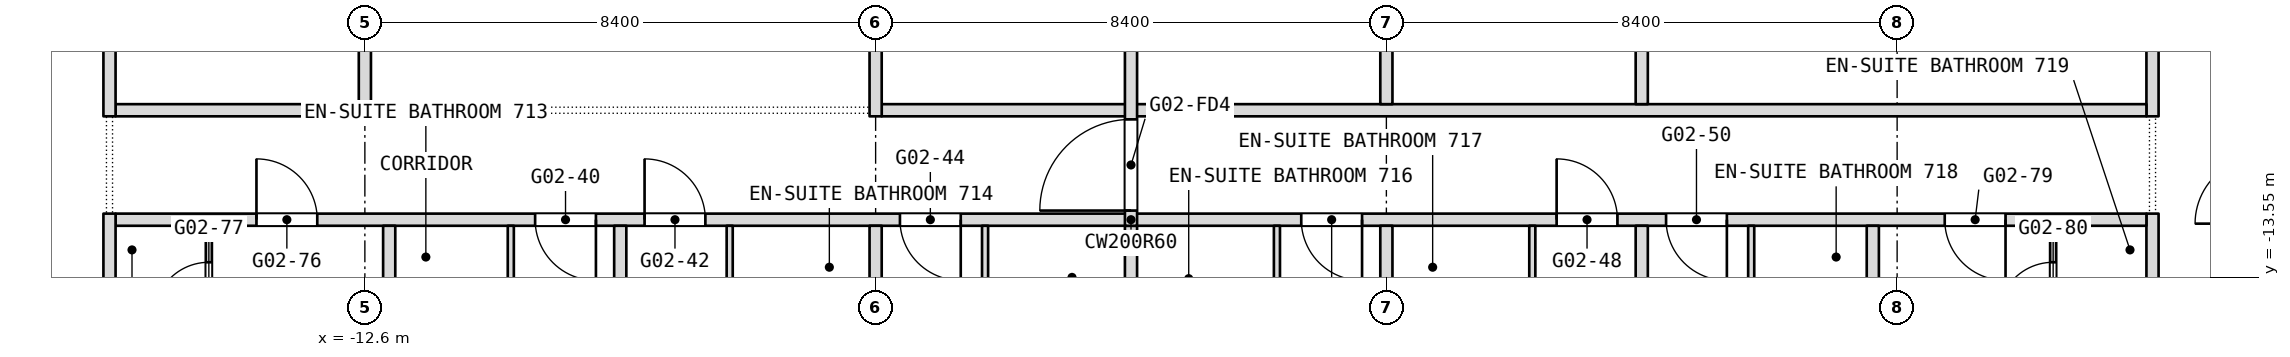
"""IFC4 building model, lengths in metres.
Left out: names, types, materials, properties, quantities, classifications, styles, units other than length and angle.
Written with IfcOpenShell. Run it as: python <this file> out.ifc"""

import sys

from ifc_helpers import new_model, si_unit, direction, frame, frame_2d, origin, place, context, subcontext, project, spatial, rectangle, extrude, element, fill, save


model = new_model("IFC4")
c1 = context("Model", 3, precision=1e-05, world=origin(), true_north=direction((0.0, 1.0)))
c2 = subcontext(c1, "Body", "Model", "MODEL_VIEW")
j1 = project(units=[si_unit("LENGTHUNIT", "METRE"), si_unit("PLANEANGLEUNIT", "RADIAN")], contexts=[c1])
p1 = place(None, origin())
s1 = spatial("IfcSite", under=j1, at=p1, CompositionType="ELEMENT")
p2 = place(p1, origin())
s2 = spatial("IfcBuilding", under=s1, at=p2, CompositionType="ELEMENT")
p3 = place(p2, frame((0.0, 0.0, 40.1)))
s3 = spatial("IfcBuildingStorey", under=s2, at=p3, CompositionType="ELEMENT", Elevation=40.1)
p4 = place(p3, frame((16.8, -17.143, 0.0), z_axis=(0.0, 0.0, 1.0), x_axis=(0.0, 1.0, 0.0)))
e1 = element("IfcWall", 1, at=p4, inside=s3, PredefinedType="PARTITIONING", context=c2, shape_type="SweptSolid", body=[
    extrude(rectangle(XDim=4.643, YDim=0.2, at=frame_2d((2.322, 0.0))), origin(), (0.0, 0.0, 1.0), 3.34),
])
p5 = place(p4, frame((0.772, 0.0, 0.0)))
e2 = element("IfcOpeningElement", 2, at=p5, cuts=e1, PredefinedType="OPENING", context=c2, shape_type="SweptSolid", body=[
    extrude(rectangle(XDim=0.9, YDim=2.1, at=frame_2d((0.45, 1.05))), frame((0.0, 0.1, 0.0), z_axis=(0.0, -1.0, 0.0), x_axis=(1.0, 0.0, 0.0)), (0.0, 0.0, 1.0), 0.2),
])
p6 = place(p3, frame((16.8, -10.9, 0.0), z_axis=(0.0, 0.0, 1.0), x_axis=(0.0, 1.0, 0.0)))
e3 = element("IfcWall", 3, at=p6, inside=s3, PredefinedType="PARTITIONING", context=c2, shape_type="SweptSolid", body=[
    extrude(rectangle(XDim=7.3, YDim=0.2, at=frame_2d((3.65, 0.0))), origin(), (0.0, 0.0, 1.0), 3.34),
])
p7 = place(p6, frame((3.15, 0.0, 0.0)))
e4 = element("IfcOpeningElement", 4, at=p7, cuts=e3, PredefinedType="OPENING", context=c2, shape_type="SweptSolid", body=[
    extrude(rectangle(XDim=1.0, YDim=2.1, at=frame_2d((0.5, 1.05))), frame((0.0, 0.1, 0.0), z_axis=(0.0, -1.0, 0.0), x_axis=(1.0, 0.0, 0.0)), (0.0, 0.0, 1.0), 0.2),
])
p8 = place(p3, frame((15.166, -15.0, 0.0), z_axis=(0.0, 0.0, 1.0), x_axis=(0.0, 1.0, 0.0)))
e5 = element("IfcWall", 5, at=p8, inside=s3, PredefinedType="PARTITIONING", context=c2, shape_type="SweptSolid", body=[
    extrude(rectangle(XDim=2.3, YDim=0.1, at=frame_2d((1.15, 0.0))), origin(), (0.0, 0.0, 1.0), 3.34),
])
p9 = place(p8, frame((0.8, 0.0, 0.0)))
e6 = element("IfcOpeningElement", 6, at=p9, cuts=e5, PredefinedType="OPENING", context=c2, shape_type="SweptSolid", body=[
    extrude(rectangle(XDim=0.9, YDim=2.1, at=frame_2d((0.45, 1.05))), frame((0.0, 0.05, 0.0), z_axis=(0.0, -1.0, 0.0), x_axis=(1.0, 0.0, 0.0)), (0.0, 0.0, 1.0), 0.1),
])
p10 = place(p3, frame((-16.7, -12.6, 0.0), z_axis=(0.0, 0.0, 1.0), x_axis=(1.0, 0.0, 0.0)))
e7 = element("IfcWall", 7, at=p10, inside=s3, PredefinedType="PARTITIONING", context=c2, shape_type="SweptSolid", body=[
    extrude(rectangle(XDim=33.4, YDim=0.2, at=frame_2d((16.7, 0.0))), origin(), (0.0, 0.0, 1.0), 3.34),
])
p11 = place(p10, frame((6.9, 0.0, 0.0)))
e8 = element("IfcOpeningElement", 8, at=p11, cuts=e7, PredefinedType="OPENING", context=c2, shape_type="SweptSolid", body=[
    extrude(rectangle(XDim=1.0, YDim=2.1, at=frame_2d((0.5, 1.05))), frame((0.0, 0.1, 0.0), z_axis=(0.0, -1.0, 0.0), x_axis=(1.0, 0.0, 0.0)), (0.0, 0.0, 1.0), 0.2),
])
p12 = place(p10, frame((8.7, 0.0, 0.0)))
e9 = element("IfcOpeningElement", 9, at=p12, cuts=e7, PredefinedType="OPENING", context=c2, shape_type="SweptSolid", body=[
    extrude(rectangle(XDim=1.0, YDim=2.1, at=frame_2d((0.5, 1.05))), frame((0.0, 0.1, 0.0), z_axis=(0.0, -1.0, 0.0), x_axis=(1.0, 0.0, 0.0)), (0.0, 0.0, 1.0), 0.2),
])
p13 = place(p10, frame((12.9, 0.0, 0.0)))
e10 = element("IfcOpeningElement", 10, at=p13, cuts=e7, PredefinedType="OPENING", context=c2, shape_type="SweptSolid", body=[
    extrude(rectangle(XDim=1.0, YDim=2.1, at=frame_2d((0.5, 1.05))), frame((0.0, 0.1, 0.0), z_axis=(0.0, -1.0, 0.0), x_axis=(1.0, 0.0, 0.0)), (0.0, 0.0, 1.0), 0.2),
])
p14 = place(p10, frame((19.5, 0.0, 0.0)))
e11 = element("IfcOpeningElement", 11, at=p14, cuts=e7, PredefinedType="OPENING", context=c2, shape_type="SweptSolid", body=[
    extrude(rectangle(XDim=1.0, YDim=2.1, at=frame_2d((0.5, 1.05))), frame((0.0, 0.1, 0.0), z_axis=(0.0, -1.0, 0.0), x_axis=(1.0, 0.0, 0.0)), (0.0, 0.0, 1.0), 0.2),
])
p15 = place(p10, frame((23.7, 0.0, 0.0)))
e12 = element("IfcOpeningElement", 12, at=p15, cuts=e7, PredefinedType="OPENING", context=c2, shape_type="SweptSolid", body=[
    extrude(rectangle(XDim=1.0, YDim=2.1, at=frame_2d((0.5, 1.05))), frame((0.0, 0.1, 0.0), z_axis=(0.0, -1.0, 0.0), x_axis=(1.0, 0.0, 0.0)), (0.0, 0.0, 1.0), 0.2),
])
p16 = place(p10, frame((25.5, 0.0, 0.0)))
e13 = element("IfcOpeningElement", 13, at=p16, cuts=e7, PredefinedType="OPENING", context=c2, shape_type="SweptSolid", body=[
    extrude(rectangle(XDim=1.0, YDim=2.1, at=frame_2d((0.5, 1.05))), frame((0.0, 0.1, 0.0), z_axis=(0.0, -1.0, 0.0), x_axis=(1.0, 0.0, 0.0)), (0.0, 0.0, 1.0), 0.2),
])
p17 = place(p10, frame((2.317, 0.0, 0.0)))
e14 = element("IfcOpeningElement", 14, at=p17, cuts=e7, PredefinedType="OPENING", context=c2, shape_type="SweptSolid", body=[
    extrude(rectangle(XDim=1.0, YDim=2.1, at=frame_2d((0.5, 1.05))), frame((0.0, 0.1, 0.0), z_axis=(0.0, -1.0, 0.0), x_axis=(1.0, 0.0, 0.0)), (0.0, 0.0, 1.0), 0.2),
])
p18 = place(p10, frame((30.083, 0.0, 0.0)))
e15 = element("IfcOpeningElement", 15, at=p18, cuts=e7, PredefinedType="OPENING", context=c2, shape_type="SweptSolid", body=[
    extrude(rectangle(XDim=1.0, YDim=2.1, at=frame_2d((0.5, 1.05))), frame((0.0, 0.1, 0.0), z_axis=(0.0, -1.0, 0.0), x_axis=(1.0, 0.0, 0.0)), (0.0, 0.0, 1.0), 0.2),
])
p19 = place(p3, frame((12.2, -15.325, 0.0), z_axis=(0.0, 0.0, 1.0), x_axis=(0.0, 1.0, 0.0)))
e16 = element("IfcWall", 16, at=p19, inside=s3, PredefinedType="PARTITIONING", context=c2, shape_type="SweptSolid", body=[
    extrude(rectangle(XDim=2.625, YDim=0.2, at=frame_2d((1.312, 0.0))), origin(), (0.0, 0.0, 1.0), 3.34),
])
p20 = place(p3, frame((-16.7, -10.8, 0.0), z_axis=(0.0, 0.0, 1.0), x_axis=(1.0, 0.0, 0.0)))
e17 = element("IfcWall", 17, at=p20, inside=s3, PredefinedType="PARTITIONING", context=c2, shape_type="SweptSolid", body=[
    extrude(rectangle(XDim=4.0, YDim=0.2, at=frame_2d((2.0, 0.0))), origin(), (0.0, 0.0, 1.0), 3.34),
])
p21 = place(p3, frame((-4.1, -10.8, 0.0), z_axis=(0.0, 0.0, 1.0), x_axis=(1.0, 0.0, 0.0)))
e18 = element("IfcWall", 18, at=p21, inside=s3, PredefinedType="PARTITIONING", context=c2, shape_type="SweptSolid", body=[
    extrude(rectangle(XDim=20.8, YDim=0.2, at=frame_2d((10.4, 0.0))), origin(), (0.0, 0.0, 1.0), 3.34),
])
p22 = place(p3, frame((10.2, -15.425, 0.0), z_axis=(0.0, 0.0, 1.0), x_axis=(0.0, 1.0, 0.0)))
e19 = element("IfcWall", 19, at=p22, inside=s3, PredefinedType="PARTITIONING", context=c2, shape_type="SweptSolid", body=[
    extrude(rectangle(XDim=2.725, YDim=0.1, at=frame_2d((1.363, 0.0))), origin(), (0.0, 0.0, 1.0), 3.34),
])
p23 = place(p22, frame((0.849, 0.0, 0.0)))
e20 = element("IfcOpeningElement", 20, at=p23, cuts=e19, PredefinedType="OPENING", context=c2, shape_type="SweptSolid", body=[
    extrude(rectangle(XDim=0.9, YDim=2.1, at=frame_2d((0.45, 1.05))), frame((0.0, 0.05, 0.0), z_axis=(0.0, -1.0, 0.0), x_axis=(1.0, 0.0, 0.0)), (0.0, 0.0, 1.0), 0.1),
])
p24 = place(p3, frame((8.4, -17.7, 0.0), z_axis=(0.0, 0.0, 1.0), x_axis=(0.0, 1.0, 0.0)))
e21 = element("IfcWall", 21, at=p24, inside=s3, PredefinedType="PARTITIONING", context=c2, shape_type="SweptSolid", body=[
    extrude(rectangle(XDim=5.0, YDim=0.2, at=frame_2d((2.5, 0.0))), origin(), (0.0, 0.0, 1.0), 3.34),
])
p25 = place(p3, frame((8.4, -10.7, 0.0), z_axis=(0.0, 0.0, 1.0), x_axis=(0.0, 1.0, 0.0)))
e22 = element("IfcWall", 22, at=p25, inside=s3, PredefinedType="PARTITIONING", context=c2, shape_type="SweptSolid", body=[
    extrude(rectangle(XDim=3.6, YDim=0.2, at=frame_2d((1.8, 0.0))), origin(), (0.0, 0.0, 1.0), 3.34),
])
p26 = place(p3, frame((6.6, -15.325, 0.0), z_axis=(0.0, 0.0, 1.0), x_axis=(0.0, 1.0, 0.0)))
e23 = element("IfcWall", 23, at=p26, inside=s3, PredefinedType="PARTITIONING", context=c2, shape_type="SweptSolid", body=[
    extrude(rectangle(XDim=2.625, YDim=0.1, at=frame_2d((1.312, 0.0))), origin(), (0.0, 0.0, 1.0), 3.34),
])
p27 = place(p26, frame((0.749, 0.0, 0.0)))
e24 = element("IfcOpeningElement", 24, at=p27, cuts=e23, PredefinedType="OPENING", context=c2, shape_type="SweptSolid", body=[
    extrude(rectangle(XDim=0.9, YDim=2.1, at=frame_2d((0.45, 1.05))), frame((0.0, 0.05, 0.0), z_axis=(0.0, -1.0, 0.0), x_axis=(1.0, 0.0, 0.0)), (0.0, 0.0, 1.0), 0.1),
])
p28 = place(p3, frame((4.2, -17.7, 0.0), z_axis=(0.0, 0.0, 1.0), x_axis=(0.0, 1.0, 0.0)))
e25 = element("IfcWall", 25, at=p28, inside=s3, PredefinedType="PARTITIONING", context=c2, shape_type="SweptSolid", body=[
    extrude(rectangle(XDim=5.0, YDim=0.2, at=frame_2d((2.5, 0.0))), origin(), (0.0, 0.0, 1.0), 3.34),
])
p29 = place(p3, frame((4.2, -10.7, 0.0), z_axis=(0.0, 0.0, 1.0), x_axis=(0.0, 1.0, 0.0)))
e26 = element("IfcWall", 26, at=p29, inside=s3, PredefinedType="PARTITIONING", context=c2, shape_type="SweptSolid", body=[
    extrude(rectangle(XDim=8.8, YDim=0.2, at=frame_2d((4.4, 0.0))), origin(), (0.0, 0.0, 1.0), 3.34),
])
p30 = place(p3, frame((2.4, -15.325, 0.0), z_axis=(0.0, 0.0, 1.0), x_axis=(0.0, 1.0, 0.0)))
e27 = element("IfcWall", 27, at=p30, inside=s3, PredefinedType="PARTITIONING", context=c2, shape_type="SweptSolid", body=[
    extrude(rectangle(XDim=2.625, YDim=0.1, at=frame_2d((1.312, 0.0))), origin(), (0.0, 0.0, 1.0), 3.34),
])
p31 = place(p3, frame((0.0, -17.7, 0.0), z_axis=(0.0, 0.0, 1.0), x_axis=(0.0, 1.0, 0.0)))
e28 = element("IfcWall", 28, at=p31, inside=s3, PredefinedType="PARTITIONING", context=c2, shape_type="SweptSolid", body=[
    extrude(rectangle(XDim=5.0, YDim=0.2, at=frame_2d((2.5, 0.0))), origin(), (0.0, 0.0, 1.0), 3.34),
])
p32 = place(p3, frame((0.0, -12.7, 0.0), z_axis=(0.0, 0.0, 1.0), x_axis=(0.0, 1.0, 0.0)))
e29 = element("IfcWall", 29, at=p32, inside=s3, PredefinedType="PARTITIONING", context=c2, shape_type="SweptSolid", body=[
    extrude(rectangle(XDim=12.7, YDim=0.2, at=frame_2d((6.35, 0.0))), origin(), (0.0, 0.0, 1.0), 3.34),
])
p33 = place(p32, frame((11.05, 0.0, 0.0)))
e30 = element("IfcOpeningElement", 30, at=p33, cuts=e29, PredefinedType="OPENING", context=c2, shape_type="SweptSolid", body=[
    extrude(rectangle(XDim=1.5, YDim=2.1, at=frame_2d((0.75, 1.05))), frame((0.0, 0.1, 0.0), z_axis=(0.0, -1.0, 0.0), x_axis=(1.0, 0.0, 0.0)), (0.0, 0.0, 1.0), 0.2),
])
p34 = place(p32, frame((0.25, 0.0, 0.0)))
e31 = element("IfcOpeningElement", 31, at=p34, cuts=e29, PredefinedType="OPENING", context=c2, shape_type="SweptSolid", body=[
    extrude(rectangle(XDim=1.5, YDim=2.1, at=frame_2d((0.75, 1.05))), frame((0.0, 0.1, 0.0), z_axis=(0.0, -1.0, 0.0), x_axis=(1.0, 0.0, 0.0)), (0.0, 0.0, 1.0), 0.2),
])
p35 = place(p3, frame((-2.4, -15.425, 0.0), z_axis=(0.0, 0.0, 1.0), x_axis=(0.0, 1.0, 0.0)))
e32 = element("IfcWall", 32, at=p35, inside=s3, PredefinedType="PARTITIONING", context=c2, shape_type="SweptSolid", body=[
    extrude(rectangle(XDim=2.725, YDim=0.1, at=frame_2d((1.363, 0.0))), origin(), (0.0, 0.0, 1.0), 3.34),
])
p36 = place(p3, frame((-4.2, -17.7, 0.0), z_axis=(0.0, 0.0, 1.0), x_axis=(0.0, 1.0, 0.0)))
e33 = element("IfcWall", 33, at=p36, inside=s3, PredefinedType="PARTITIONING", context=c2, shape_type="SweptSolid", body=[
    extrude(rectangle(XDim=5.0, YDim=0.2, at=frame_2d((2.5, 0.0))), origin(), (0.0, 0.0, 1.0), 3.34),
])
p37 = place(p3, frame((-4.2, -10.9, 0.0), z_axis=(0.0, 0.0, 1.0), x_axis=(0.0, 1.0, 0.0)))
e34 = element("IfcWall", 34, at=p37, inside=s3, PredefinedType="PARTITIONING", context=c2, shape_type="SweptSolid", body=[
    extrude(rectangle(XDim=9.0, YDim=0.2, at=frame_2d((4.5, 0.0))), origin(), (0.0, 0.0, 1.0), 3.34),
])
p38 = place(p3, frame((-6.6, -15.425, 0.0), z_axis=(0.0, 0.0, 1.0), x_axis=(0.0, 1.0, 0.0)))
e35 = element("IfcWall", 35, at=p38, inside=s3, PredefinedType="PARTITIONING", context=c2, shape_type="SweptSolid", body=[
    extrude(rectangle(XDim=2.725, YDim=0.1, at=frame_2d((1.363, 0.0))), origin(), (0.0, 0.0, 1.0), 3.34),
])
p39 = place(p38, frame((0.849, 0.0, 0.0)))
e36 = element("IfcOpeningElement", 36, at=p39, cuts=e35, PredefinedType="OPENING", context=c2, shape_type="SweptSolid", body=[
    extrude(rectangle(XDim=0.9, YDim=2.1, at=frame_2d((0.45, 1.05))), frame((0.0, 0.05, 0.0), z_axis=(0.0, -1.0, 0.0), x_axis=(1.0, 0.0, 0.0)), (0.0, 0.0, 1.0), 0.1),
])
p40 = place(p3, frame((-8.4, -17.7, 0.0), z_axis=(0.0, 0.0, 1.0), x_axis=(0.0, 1.0, 0.0)))
e37 = element("IfcWall", 37, at=p40, inside=s3, PredefinedType="PARTITIONING", context=c2, shape_type="SweptSolid", body=[
    extrude(rectangle(XDim=5.0, YDim=0.2, at=frame_2d((2.5, 0.0))), origin(), (0.0, 0.0, 1.0), 3.34),
])
p41 = place(p3, frame((-10.2, -15.325, 0.0), z_axis=(0.0, 0.0, 1.0), x_axis=(0.0, 1.0, 0.0)))
e38 = element("IfcWall", 38, at=p41, inside=s3, PredefinedType="PARTITIONING", context=c2, shape_type="SweptSolid", body=[
    extrude(rectangle(XDim=2.625, YDim=0.1, at=frame_2d((1.312, 0.0))), origin(), (0.0, 0.0, 1.0), 3.34),
])
p42 = place(p41, frame((0.749, 0.0, 0.0)))
e39 = element("IfcOpeningElement", 39, at=p42, cuts=e38, PredefinedType="OPENING", context=c2, shape_type="SweptSolid", body=[
    extrude(rectangle(XDim=0.9, YDim=2.1, at=frame_2d((0.45, 1.05))), frame((0.0, 0.05, 0.0), z_axis=(0.0, -1.0, 0.0), x_axis=(1.0, 0.0, 0.0)), (0.0, 0.0, 1.0), 0.1),
])
p43 = place(p3, frame((-12.2, -15.275, 0.0), z_axis=(0.0, 0.0, 1.0), x_axis=(0.0, 1.0, 0.0)))
e40 = element("IfcWall", 40, at=p43, inside=s3, PredefinedType="PARTITIONING", context=c2, shape_type="SweptSolid", body=[
    extrude(rectangle(XDim=2.575, YDim=0.2, at=frame_2d((1.288, 0.0))), origin(), (0.0, 0.0, 1.0), 3.34),
])
p44 = place(p3, frame((-12.6, -10.9, 0.0), z_axis=(0.0, 0.0, 1.0), x_axis=(0.0, 1.0, 0.0)))
e41 = element("IfcWall", 41, at=p44, inside=s3, PredefinedType="PARTITIONING", context=c2, shape_type="SweptSolid", body=[
    extrude(rectangle(XDim=5.6, YDim=0.2, at=frame_2d((2.8, 0.0))), origin(), (0.0, 0.0, 1.0), 3.34),
])
p45 = place(p3, frame((-15.166, -15.0, 0.0), z_axis=(0.0, 0.0, 1.0), x_axis=(0.0, 1.0, 0.0)))
e42 = element("IfcWall", 42, at=p45, inside=s3, PredefinedType="PARTITIONING", context=c2, shape_type="SweptSolid", body=[
    extrude(rectangle(XDim=2.3, YDim=0.1, at=frame_2d((1.15, 0.0))), origin(), (0.0, 0.0, 1.0), 3.34),
])
p46 = place(p45, frame((0.8, 0.0, 0.0)))
e43 = element("IfcOpeningElement", 43, at=p46, cuts=e42, PredefinedType="OPENING", context=c2, shape_type="SweptSolid", body=[
    extrude(rectangle(XDim=0.9, YDim=2.1, at=frame_2d((0.45, 1.05))), frame((0.0, 0.05, 0.0), z_axis=(0.0, -1.0, 0.0), x_axis=(1.0, 0.0, 0.0)), (0.0, 0.0, 1.0), 0.1),
])
p47 = place(p3, frame((-16.8, -17.143, 0.0), z_axis=(0.0, 0.0, 1.0), x_axis=(0.0, 1.0, 0.0)))
e44 = element("IfcWall", 44, at=p47, inside=s3, PredefinedType="PARTITIONING", context=c2, shape_type="SweptSolid", body=[
    extrude(rectangle(XDim=4.643, YDim=0.2, at=frame_2d((2.322, 0.0))), origin(), (0.0, 0.0, 1.0), 3.34),
])
p48 = place(p47, frame((0.772, 0.0, 0.0)))
e45 = element("IfcOpeningElement", 45, at=p48, cuts=e44, PredefinedType="OPENING", context=c2, shape_type="SweptSolid", body=[
    extrude(rectangle(XDim=0.9, YDim=2.1, at=frame_2d((0.45, 1.05))), frame((0.0, 0.1, 0.0), z_axis=(0.0, -1.0, 0.0), x_axis=(1.0, 0.0, 0.0)), (0.0, 0.0, 1.0), 0.2),
])
p49 = place(p3, frame((-16.8, -10.9, 0.0), z_axis=(0.0, 0.0, 1.0), x_axis=(0.0, 1.0, 0.0)))
e46 = element("IfcWall", 46, at=p49, inside=s3, PredefinedType="PARTITIONING", context=c2, shape_type="SweptSolid", body=[
    extrude(rectangle(XDim=9.0, YDim=0.2, at=frame_2d((4.5, 0.0))), origin(), (0.0, 0.0, 1.0), 3.34),
])
p50 = place(p9, origin())
e47 = element("IfcDoor", 47, at=p50, inside=s3, OperationType="SINGLE_SWING_RIGHT", PredefinedType="DOOR", context=c2, shape_type="SweptSolid", body=[
    extrude(rectangle(XDim=0.9, YDim=2.1, at=frame_2d((0.45, 1.05))), frame((0.0, 0.025, 0.0), z_axis=(0.0, -1.0, 0.0), x_axis=(1.0, 0.0, 0.0)), (0.0, 0.0, 1.0), 0.05),
])
fill(e6, e47)
p51 = place(p11, origin())
e48 = element("IfcDoor", 48, at=p51, inside=s3, OperationType="SINGLE_SWING_RIGHT", PredefinedType="DOOR", context=c2, shape_type="SweptSolid", body=[
    extrude(rectangle(XDim=1.0, YDim=2.1, at=frame_2d((0.5, 1.05))), frame((0.0, 0.025, 0.0), z_axis=(0.0, -1.0, 0.0), x_axis=(1.0, 0.0, 0.0)), (0.0, 0.0, 1.0), 0.05),
])
fill(e8, e48)
p52 = place(p12, origin())
e49 = element("IfcDoor", 49, at=p52, inside=s3, OperationType="SINGLE_SWING_RIGHT", PredefinedType="DOOR", context=c2, shape_type="SweptSolid", body=[
    extrude(rectangle(XDim=1.0, YDim=2.1, at=frame_2d((0.5, 1.05))), frame((0.0, 0.025, 0.0), z_axis=(0.0, -1.0, 0.0), x_axis=(1.0, 0.0, 0.0)), (0.0, 0.0, 1.0), 0.05),
])
fill(e9, e49)
p53 = place(p13, origin())
e50 = element("IfcDoor", 50, at=p53, inside=s3, OperationType="SINGLE_SWING_RIGHT", PredefinedType="DOOR", context=c2, shape_type="SweptSolid", body=[
    extrude(rectangle(XDim=1.0, YDim=2.1, at=frame_2d((0.5, 1.05))), frame((0.0, 0.025, 0.0), z_axis=(0.0, -1.0, 0.0), x_axis=(1.0, 0.0, 0.0)), (0.0, 0.0, 1.0), 0.05),
])
fill(e10, e50)
p54 = place(p14, origin())
e51 = element("IfcDoor", 51, at=p54, inside=s3, OperationType="SINGLE_SWING_RIGHT", PredefinedType="DOOR", context=c2, shape_type="SweptSolid", body=[
    extrude(rectangle(XDim=1.0, YDim=2.1, at=frame_2d((0.5, 1.05))), frame((0.0, 0.025, 0.0), z_axis=(0.0, -1.0, 0.0), x_axis=(1.0, 0.0, 0.0)), (0.0, 0.0, 1.0), 0.05),
])
fill(e11, e51)
p55 = place(p15, origin())
e52 = element("IfcDoor", 52, at=p55, inside=s3, OperationType="SINGLE_SWING_RIGHT", PredefinedType="DOOR", context=c2, shape_type="SweptSolid", body=[
    extrude(rectangle(XDim=1.0, YDim=2.1, at=frame_2d((0.5, 1.05))), frame((0.0, 0.025, 0.0), z_axis=(0.0, -1.0, 0.0), x_axis=(1.0, 0.0, 0.0)), (0.0, 0.0, 1.0), 0.05),
])
fill(e12, e52)
p56 = place(p16, origin())
e53 = element("IfcDoor", 53, at=p56, inside=s3, OperationType="SINGLE_SWING_RIGHT", PredefinedType="DOOR", context=c2, shape_type="SweptSolid", body=[
    extrude(rectangle(XDim=1.0, YDim=2.1, at=frame_2d((0.5, 1.05))), frame((0.0, 0.025, 0.0), z_axis=(0.0, -1.0, 0.0), x_axis=(1.0, 0.0, 0.0)), (0.0, 0.0, 1.0), 0.05),
])
fill(e13, e53)
p57 = place(p17, origin())
e54 = element("IfcDoor", 54, at=p57, inside=s3, OperationType="SINGLE_SWING_RIGHT", PredefinedType="DOOR", context=c2, shape_type="SweptSolid", body=[
    extrude(rectangle(XDim=1.0, YDim=2.1, at=frame_2d((0.5, 1.05))), frame((0.0, 0.025, 0.0), z_axis=(0.0, -1.0, 0.0), x_axis=(1.0, 0.0, 0.0)), (0.0, 0.0, 1.0), 0.05),
])
fill(e14, e54)
p58 = place(p18, origin())
e55 = element("IfcDoor", 55, at=p58, inside=s3, OperationType="SINGLE_SWING_LEFT", PredefinedType="DOOR", context=c2, shape_type="SweptSolid", body=[
    extrude(rectangle(XDim=1.0, YDim=2.1, at=frame_2d((0.5, 1.05))), frame((0.0, 0.025, 0.0), z_axis=(0.0, -1.0, 0.0), x_axis=(1.0, 0.0, 0.0)), (0.0, 0.0, 1.0), 0.05),
])
fill(e15, e55)
p59 = place(p46, origin())
e56 = element("IfcDoor", 56, at=p59, inside=s3, OperationType="SINGLE_SWING_RIGHT", PredefinedType="DOOR", context=c2, shape_type="SweptSolid", body=[
    extrude(rectangle(XDim=0.9, YDim=2.1, at=frame_2d((0.45, 1.05))), frame((0.0, 0.025, 0.0), z_axis=(0.0, -1.0, 0.0), x_axis=(1.0, 0.0, 0.0)), (0.0, 0.0, 1.0), 0.05),
])
fill(e43, e56)
p60 = place(p34, origin())
e57 = element("IfcDoor", 57, at=p60, inside=s3, OperationType="DOUBLE_DOOR_DOUBLE_SWING", PredefinedType="DOOR", context=c2, shape_type="SweptSolid", body=[
    extrude(rectangle(XDim=1.5, YDim=2.1, at=frame_2d((0.75, 1.05))), frame((0.0, 0.025, 0.0), z_axis=(0.0, -1.0, 0.0), x_axis=(1.0, 0.0, 0.0)), (0.0, 0.0, 1.0), 0.05),
])
fill(e31, e57)
save(model, sys.argv[1])
